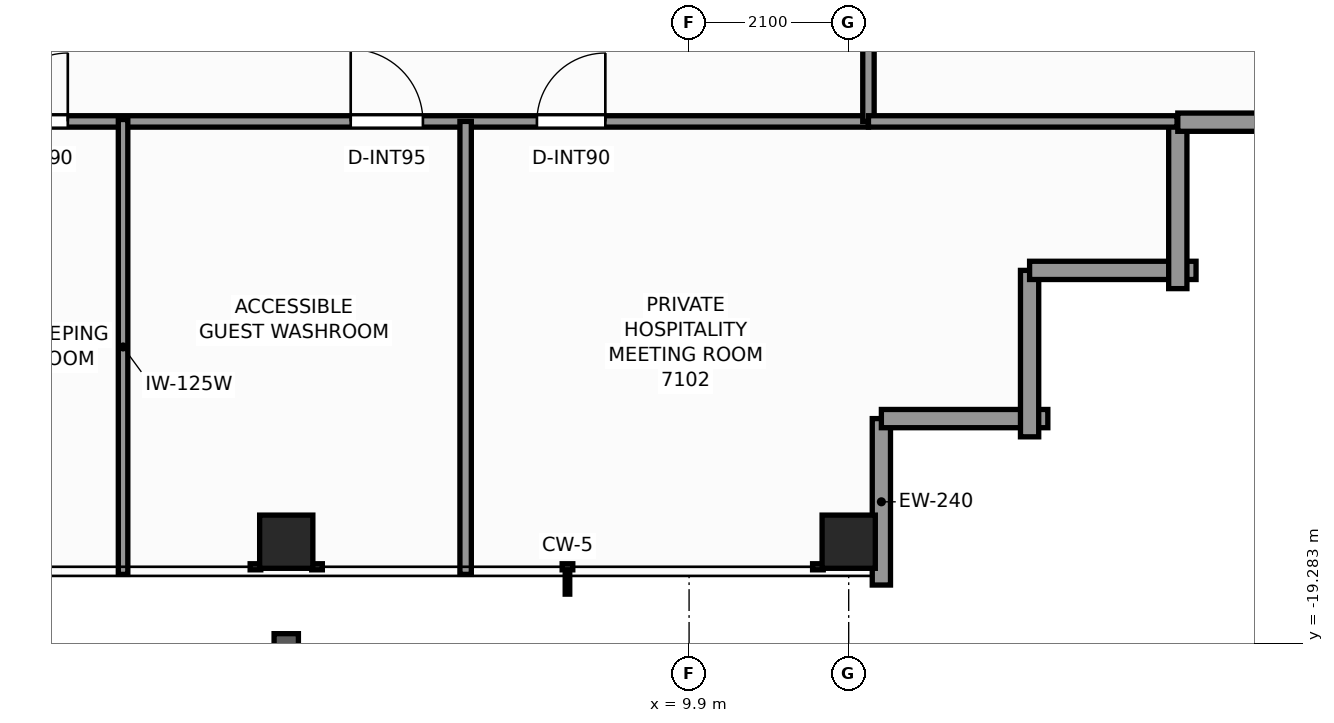
"""IFC4 building model, lengths in metres.
Left out: names, types, materials, properties, quantities, classifications, styles, units other than length and angle.
Written with IfcOpenShell. Run it as: python <this file> out.ifc"""

import sys

from ifc_helpers import new_model, si_unit, direction, frame, frame_2d, origin, origin_2d, place, context, subcontext, project, spatial, rectangle, extrude, element, fill, save


model = new_model("IFC4")
c1 = context("Model", 3, precision=1e-05, world=origin(), true_north=direction((0.0, 1.0)))
c2 = subcontext(c1, "Body", "Model", "MODEL_VIEW")
j1 = project(units=[si_unit("LENGTHUNIT", "METRE"), si_unit("PLANEANGLEUNIT", "RADIAN")], contexts=[c1])
p1 = place(None, origin())
s1 = spatial("IfcSite", under=j1, at=p1, CompositionType="ELEMENT")
p2 = place(p1, origin())
s2 = spatial("IfcBuilding", under=s1, at=p2, CompositionType="ELEMENT")
p3 = place(p2, frame((0.0, 0.0, 244.4)))
s3 = spatial("IfcBuildingStorey", under=s2, at=p3, CompositionType="ELEMENT", Elevation=244.4)
for number, where, z_axis, x_axis in (
    (1, (4.6, -17.95, 0.0), (0.0, 0.0, 1.0), (1.0, 0.0, 0.0)),
    (2, (12.0, -17.95, 0.0), (0.0, 0.0, 1.0), (1.0, 0.0, 0.0)),
):
    element("IfcColumn", number, at=place(p3, frame(where, z_axis=z_axis, x_axis=x_axis)), inside=s3, PredefinedType="COLUMN", context=c2, shape_type="SweptSolid", body=[
        extrude(rectangle(XDim=0.7, YDim=0.7, at=origin_2d()), origin(), (0.0, 0.0, 1.0), 3.5),
    ])
p4 = place(p3, frame((12.43, -16.33, 0.0), z_axis=(0.0, 0.0, 1.0), x_axis=(0.0, -1.0, 0.0)))
e3 = element("IfcWall", 3, at=p4, inside=s3, PredefinedType="STANDARD", context=c2, shape_type="SweptSolid", body=[
    extrude(rectangle(XDim=2.19, YDim=0.24, at=frame_2d((1.095, 0.0))), origin(), (0.0, 0.0, 1.0), 2.633),
])
for number, where, z_axis, x_axis in (
    (4, (14.62, -16.33, 0.0), (0.0, 0.0, 1.0), (-1.0, 0.0, 0.0)),
    (5, (14.38, -14.38, 0.0), (0.0, 0.0, 1.0), (0.0, -1.0, 0.0)),
    (6, (16.57, -14.38, 0.0), (0.0, 0.0, 1.0), (-1.0, 0.0, 0.0)),
    (7, (16.33, -12.43, 0.0), (0.0, 0.0, 1.0), (0.0, -1.0, 0.0)),
):
    element("IfcWall", number, at=place(p3, frame(where, z_axis=z_axis, x_axis=x_axis)), inside=s3, PredefinedType="STANDARD", context=c2, shape_type="SweptSolid", body=[
        extrude(rectangle(XDim=2.19, YDim=0.24, at=frame_2d((1.095, 0.0))), origin(), (0.0, 0.0, 1.0), 2.633),
    ])
p5 = place(p3, frame((18.52, -12.43, 0.0), z_axis=(0.0, 0.0, 1.0), x_axis=(-1.0, 0.0, 0.0)))
e8 = element("IfcWall", 8, at=p5, inside=s3, PredefinedType="STANDARD", context=c2, shape_type="SweptSolid", body=[
    extrude(rectangle(XDim=2.19, YDim=0.24, at=frame_2d((1.095, 0.0))), origin(), (0.0, 0.0, 1.0), 2.633),
])
p6 = place(p3, frame((-12.58, -12.42, 0.0), z_axis=(0.0, 0.0, 1.0), x_axis=(1.0, 0.0, 0.0)))
e9 = element("IfcWall", 9, at=p6, inside=s3, PredefinedType="PARTITIONING", context=c2, shape_type="SweptSolid", body=[
    extrude(rectangle(XDim=24.84, YDim=0.15, at=frame_2d((12.42, 0.0))), origin(), (0.0, 0.0, 1.0), 2.539),
])
p7 = place(p6, frame((4.595, 0.0, 0.0)))
e10 = element("IfcOpeningElement", 10, at=p7, cuts=e9, PredefinedType="OPENING", context=c2, shape_type="SweptSolid", body=[
    extrude(rectangle(XDim=0.9, YDim=2.06, at=frame_2d((0.45, 1.03))), frame((0.0, 0.085, 0.0), z_axis=(0.0, -1.0, 0.0), x_axis=(1.0, 0.0, 0.0)), (0.0, 0.0, 1.0), 0.17),
])
p8 = place(p6, frame((13.406, 0.0, 0.0)))
e11 = element("IfcOpeningElement", 11, at=p8, cuts=e9, PredefinedType="OPENING", context=c2, shape_type="SweptSolid", body=[
    extrude(rectangle(XDim=0.9, YDim=2.06, at=frame_2d((0.45, 1.03))), frame((0.0, 0.085, 0.0), z_axis=(0.0, -1.0, 0.0), x_axis=(1.0, 0.0, 0.0)), (0.0, 0.0, 1.0), 0.17),
])
p9 = place(p6, frame((18.028, 0.0, 0.0)))
e12 = element("IfcOpeningElement", 12, at=p9, cuts=e9, PredefinedType="OPENING", context=c2, shape_type="SweptSolid", body=[
    extrude(rectangle(XDim=0.95, YDim=2.06, at=frame_2d((0.475, 1.03))), frame((0.0, 0.085, 0.0), z_axis=(0.0, -1.0, 0.0), x_axis=(1.0, 0.0, 0.0)), (0.0, 0.0, 1.0), 0.17),
])
p10 = place(p6, frame((20.478, 0.0, 0.0)))
e13 = element("IfcOpeningElement", 13, at=p10, cuts=e9, PredefinedType="OPENING", context=c2, shape_type="SweptSolid", body=[
    extrude(rectangle(XDim=0.9, YDim=2.06, at=frame_2d((0.45, 1.03))), frame((0.0, 0.085, 0.0), z_axis=(0.0, -1.0, 0.0), x_axis=(1.0, 0.0, 0.0)), (0.0, 0.0, 1.0), 0.17),
])
p11 = place(p3, frame((12.26, -12.42, 0.0), z_axis=(0.0, 0.0, 1.0), x_axis=(0.0, 1.0, 0.0)))
e14 = element("IfcWall", 14, at=p11, inside=s3, PredefinedType="PARTITIONING", context=c2, shape_type="SweptSolid", body=[
    extrude(rectangle(XDim=24.84, YDim=0.15, at=frame_2d((12.42, 0.0))), origin(), (0.0, 0.0, 1.0), 2.539),
])
p12 = place(p11, frame((3.283, 0.0, 0.0)))
e15 = element("IfcOpeningElement", 15, at=p12, cuts=e14, PredefinedType="OPENING", context=c2, shape_type="SweptSolid", body=[
    extrude(rectangle(XDim=0.9, YDim=2.06, at=frame_2d((0.45, 1.03))), frame((0.0, 0.085, 0.0), z_axis=(0.0, -1.0, 0.0), x_axis=(1.0, 0.0, 0.0)), (0.0, 0.0, 1.0), 0.17),
])
p13 = place(p11, frame((9.915, 0.0, 0.0)))
e16 = element("IfcOpeningElement", 16, at=p13, cuts=e14, PredefinedType="OPENING", context=c2, shape_type="SweptSolid", body=[
    extrude(rectangle(XDim=0.95, YDim=2.06, at=frame_2d((0.475, 1.03))), frame((0.0, 0.085, 0.0), z_axis=(0.0, -1.0, 0.0), x_axis=(1.0, 0.0, 0.0)), (0.0, 0.0, 1.0), 0.17),
])
p14 = place(p11, frame((18.038, 0.0, 0.0)))
e17 = element("IfcOpeningElement", 17, at=p14, cuts=e14, PredefinedType="OPENING", context=c2, shape_type="SweptSolid", body=[
    extrude(rectangle(XDim=0.95, YDim=2.06, at=frame_2d((0.475, 1.03))), frame((0.0, 0.085, 0.0), z_axis=(0.0, -1.0, 0.0), x_axis=(1.0, 0.0, 0.0)), (0.0, 0.0, 1.0), 0.17),
])
p15 = place(p11, frame((20.309, 0.0, 0.0)))
e18 = element("IfcOpeningElement", 18, at=p15, cuts=e14, PredefinedType="OPENING", context=c2, shape_type="SweptSolid", body=[
    extrude(rectangle(XDim=0.95, YDim=2.06, at=frame_2d((0.475, 1.03))), frame((0.0, 0.085, 0.0), z_axis=(0.0, -1.0, 0.0), x_axis=(1.0, 0.0, 0.0)), (0.0, 0.0, 1.0), 0.17),
])
p16 = place(p3, frame((12.26, -12.42, 0.0), z_axis=(0.0, 0.0, 1.0), x_axis=(1.0, 0.0, 0.0)))
e19 = element("IfcWall", 19, at=p16, inside=s3, PredefinedType="PARTITIONING", context=c2, shape_type="SweptSolid", body=[
    extrude(rectangle(XDim=4.06, YDim=0.15, at=frame_2d((2.03, 0.0))), origin(), (0.0, 0.0, 1.0), 3.25),
])
p17 = place(p3, frame((6.96, -18.38, 0.0), z_axis=(0.0, 0.0, 1.0), x_axis=(0.0, 1.0, 0.0)))
e20 = element("IfcWall", 20, at=p17, inside=s3, PredefinedType="PARTITIONING", context=c2, shape_type="SweptSolid", body=[
    extrude(rectangle(XDim=5.96, YDim=0.15, at=frame_2d((2.98, 0.0))), origin(), (0.0, 0.0, 1.0), 2.623),
])
p18 = place(p3, frame((2.453, -18.38, 0.0), z_axis=(0.0, 0.0, 1.0), x_axis=(0.0, 1.0, 0.0)))
e21 = element("IfcWall", 21, at=p18, inside=s3, PredefinedType="PARTITIONING", context=c2, shape_type="SweptSolid", body=[
    extrude(rectangle(XDim=5.985, YDim=0.125, at=frame_2d((2.992, 0.0))), origin(), (0.0, 0.0, 1.0), 2.623),
])
p19 = place(p8, origin())
e22 = element("IfcDoor", 22, at=p19, inside=s3, OperationType="SINGLE_SWING_RIGHT", PredefinedType="DOOR", context=c2, shape_type="SweptSolid", body=[
    extrude(rectangle(XDim=0.9, YDim=2.06, at=frame_2d((0.45, 1.03))), frame((0.0, 0.025, 0.0), z_axis=(0.0, -1.0, 0.0), x_axis=(1.0, 0.0, 0.0)), (0.0, 0.0, 1.0), 0.05),
])
fill(e11, e22)
p20 = place(p9, origin())
e23 = element("IfcDoor", 23, at=p20, inside=s3, OperationType="SINGLE_SWING_LEFT", PredefinedType="DOOR", context=c2, shape_type="SweptSolid", body=[
    extrude(rectangle(XDim=0.95, YDim=2.06, at=frame_2d((0.475, 1.03))), frame((0.0, 0.025, 0.0), z_axis=(0.0, -1.0, 0.0), x_axis=(1.0, 0.0, 0.0)), (0.0, 0.0, 1.0), 0.05),
])
fill(e12, e23)
p21 = place(p10, origin())
e24 = element("IfcDoor", 24, at=p21, inside=s3, OperationType="SINGLE_SWING_RIGHT", PredefinedType="DOOR", context=c2, shape_type="SweptSolid", body=[
    extrude(rectangle(XDim=0.9, YDim=2.06, at=frame_2d((0.45, 1.03))), frame((0.0, 0.025, 0.0), z_axis=(0.0, -1.0, 0.0), x_axis=(1.0, 0.0, 0.0)), (0.0, 0.0, 1.0), 0.05),
])
fill(e13, e24)
save(model, sys.argv[1])
